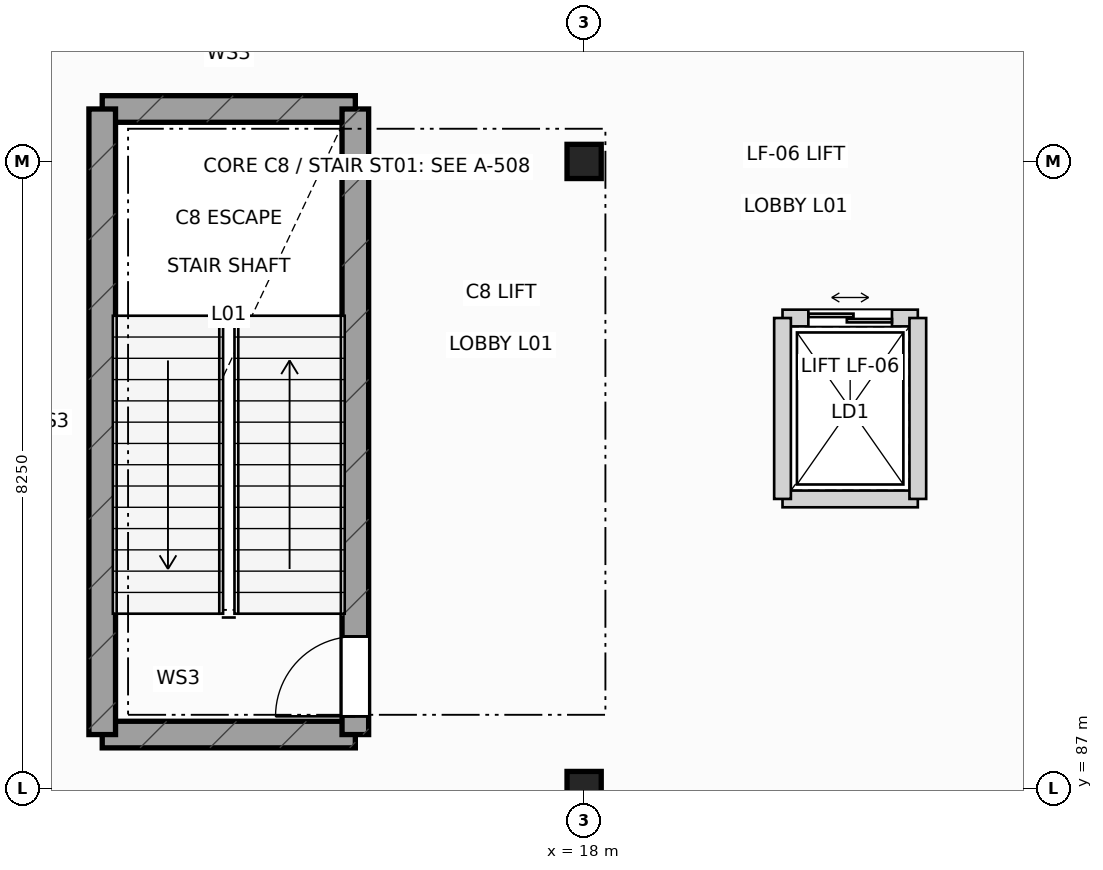
"""IFC4 building model, lengths in metres.
Left out: names, types, materials, properties, quantities, classifications, styles, units other than length and angle.
Written with IfcOpenShell. Run it as: python <this file> out.ifc"""

import sys

from ifc_helpers import new_model, si_unit, direction, frame, frame_2d, origin, origin_2d, place, context, subcontext, project, spatial, rectangle, extrude, element, fill, save


model = new_model("IFC4")
c1 = context("Model", 3, precision=1e-05, world=origin(), true_north=direction((0.0, 1.0)))
c2 = subcontext(c1, "Body", "Model", "MODEL_VIEW")
j1 = project(units=[si_unit("LENGTHUNIT", "METRE"), si_unit("PLANEANGLEUNIT", "RADIAN")], contexts=[c1])
p1 = place(None, origin())
s1 = spatial("IfcSite", under=j1, at=p1, CompositionType="ELEMENT")
p2 = place(p1, origin())
s2 = spatial("IfcBuilding", under=s1, at=p2, CompositionType="ELEMENT")
p3 = place(p2, frame((0.0, 0.0, 6.0)))
s3 = spatial("IfcBuildingStorey", under=s2, at=p3, CompositionType="ELEMENT", Elevation=6.0)
for number, where, z_axis, x_axis in (
    (1, (18.0, 87.0, 0.0), (0.0, 0.0, 1.0), (1.0, 0.0, 0.0)),
    (2, (18.0, 95.25, 0.0), (0.0, 0.0, 1.0), (1.0, 0.0, 0.0)),
):
    element("IfcColumn", number, at=place(p3, frame(where, z_axis=z_axis, x_axis=x_axis)), inside=s3, PredefinedType="COLUMN", context=c2, shape_type="SweptSolid", body=[
        extrude(rectangle(XDim=0.45, YDim=0.45, at=origin_2d()), origin(), (0.0, 0.0, 1.0), 5.4),
    ])
for number, where, z_axis, x_axis in (
    (3, (11.66, 87.71, 0.0), (0.0, 0.0, 1.0), (1.0, 0.0, 0.0)),
    (4, (11.66, 95.94, 0.0), (0.0, 0.0, 1.0), (1.0, 0.0, 0.0)),
):
    element("IfcWall", number, at=place(p3, frame(where, z_axis=z_axis, x_axis=x_axis)), inside=s3, PredefinedType="SHEAR", context=c2, shape_type="SweptSolid", body=[
        extrude(rectangle(XDim=3.33, YDim=0.35, at=frame_2d((1.665, 0.0))), origin(), (0.0, 0.0, 1.0), 5.05),
    ])
p4 = place(p3, frame((11.66, 87.71, 0.0), z_axis=(0.0, 0.0, 1.0), x_axis=(0.0, 1.0, 0.0)))
e5 = element("IfcWall", 5, at=p4, inside=s3, PredefinedType="SHEAR", context=c2, shape_type="SweptSolid", body=[
    extrude(rectangle(XDim=8.23, YDim=0.35, at=frame_2d((4.115, 0.0))), origin(), (0.0, 0.0, 1.0), 5.05),
])
p5 = place(p3, frame((14.99, 87.71, 0.0), z_axis=(0.0, 0.0, 1.0), x_axis=(0.0, 1.0, 0.0)))
e6 = element("IfcWall", 6, at=p5, inside=s3, PredefinedType="SHEAR", context=c2, shape_type="SweptSolid", body=[
    extrude(rectangle(XDim=8.23, YDim=0.35, at=frame_2d((4.115, 0.0))), origin(), (0.0, 0.0, 1.0), 5.05),
])
p6 = place(p5, frame((0.24, 0.0, 0.0)))
e7 = element("IfcOpeningElement", 7, at=p6, cuts=e6, PredefinedType="OPENING", context=c2, shape_type="SweptSolid", body=[
    extrude(rectangle(XDim=1.05, YDim=2.18, at=frame_2d((0.525, 1.09))), frame((0.0, 0.185, 0.0), z_axis=(0.0, -1.0, 0.0), x_axis=(1.0, 0.0, 0.0)), (0.0, 0.0, 1.0), 0.37),
])
p7 = place(p3, frame((20.61, 90.81, 0.0), z_axis=(0.0, 0.0, 1.0), x_axis=(1.0, 0.0, 0.0)))
e8 = element("IfcWall", 8, at=p7, inside=s3, PredefinedType="PARTITIONING", context=c2, shape_type="SweptSolid", body=[
    extrude(rectangle(XDim=1.78, YDim=0.22, at=frame_2d((0.89, 0.0))), origin(), (0.0, 0.0, 1.0), 5.015),
])
p8 = place(p3, frame((20.61, 93.19, 0.0), z_axis=(0.0, 0.0, 1.0), x_axis=(1.0, 0.0, 0.0)))
e9 = element("IfcWall", 9, at=p8, inside=s3, PredefinedType="PARTITIONING", context=c2, shape_type="SweptSolid", body=[
    extrude(rectangle(XDim=1.78, YDim=0.22, at=frame_2d((0.89, 0.0))), origin(), (0.0, 0.0, 1.0), 5.015),
])
p9 = place(p8, frame((0.34, 0.0, 0.0)))
e10 = element("IfcOpeningElement", 10, at=p9, cuts=e9, PredefinedType="OPENING", context=c2, shape_type="SweptSolid", body=[
    extrude(rectangle(XDim=1.1, YDim=2.18, at=frame_2d((0.55, 1.09))), frame((0.0, 0.12, 0.0), z_axis=(0.0, -1.0, 0.0), x_axis=(1.0, 0.0, 0.0)), (0.0, 0.0, 1.0), 0.24),
])
for number, where, z_axis, x_axis in (
    (11, (20.61, 90.81, 0.0), (0.0, 0.0, 1.0), (0.0, 1.0, 0.0)),
    (12, (22.39, 90.81, 0.0), (0.0, 0.0, 1.0), (0.0, 1.0, 0.0)),
):
    element("IfcWall", number, at=place(p3, frame(where, z_axis=z_axis, x_axis=x_axis)), inside=s3, PredefinedType="PARTITIONING", context=c2, shape_type="SweptSolid", body=[
        extrude(rectangle(XDim=2.38, YDim=0.22, at=frame_2d((1.19, 0.0))), origin(), (0.0, 0.0, 1.0), 4.565),
    ])
p10 = place(p6, origin())
e13 = element("IfcDoor", 13, at=p10, inside=s3, OperationType="SINGLE_SWING_LEFT", PredefinedType="DOOR", context=c2, shape_type="SweptSolid", body=[
    extrude(rectangle(XDim=1.05, YDim=2.18, at=frame_2d((0.525, 1.09))), frame((0.0, 0.025, 0.0), z_axis=(0.0, -1.0, 0.0), x_axis=(1.0, 0.0, 0.0)), (0.0, 0.0, 1.0), 0.05),
])
fill(e7, e13)
p11 = place(p9, origin())
e14 = element("IfcDoor", 14, at=p11, inside=s3, OperationType="DOUBLE_DOOR_SLIDING", PredefinedType="DOOR", context=c2, shape_type="SweptSolid", body=[
    extrude(rectangle(XDim=1.1, YDim=2.18, at=frame_2d((0.55, 1.09))), frame((0.0, 0.025, 0.0), z_axis=(0.0, -1.0, 0.0), x_axis=(1.0, 0.0, 0.0)), (0.0, 0.0, 1.0), 0.05),
])
fill(e10, e14)
save(model, sys.argv[1])
